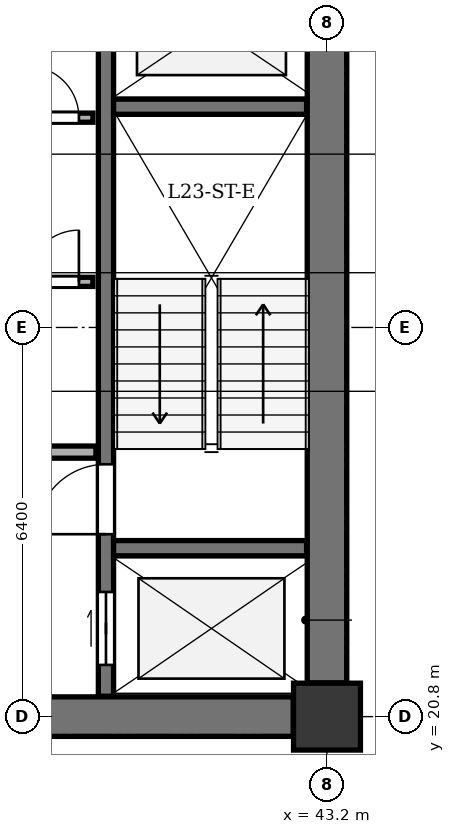
"""IFC4 building model, lengths in metres.
Left out: names, types, materials, properties, quantities, classifications, styles, units other than length and angle.
Written with IfcOpenShell. Run it as: python <this file> out.ifc"""

import sys

from ifc_helpers import new_model, si_unit, direction, frame, frame_2d, origin, origin_2d, place, context, subcontext, project, spatial, rectangle, extrude, element, fill, save


model = new_model("IFC4")
c1 = context("Model", 3, precision=1e-05, world=origin(), true_north=direction((0.0, 1.0)))
c2 = subcontext(c1, "Body", "Model", "MODEL_VIEW")
j1 = project(units=[si_unit("LENGTHUNIT", "METRE"), si_unit("PLANEANGLEUNIT", "RADIAN")], contexts=[c1])
p1 = place(None, origin())
s1 = spatial("IfcSite", under=j1, at=p1, CompositionType="ELEMENT")
p2 = place(p1, origin())
s2 = spatial("IfcBuilding", under=s1, at=p2, CompositionType="ELEMENT")
p3 = place(p2, frame((0.0, 0.0, 94.5)))
s3 = spatial("IfcBuildingStorey", under=s2, at=p3, CompositionType="ELEMENT", Elevation=94.5)
p4 = place(p3, frame((43.2, 20.8, 0.0), z_axis=(0.0, 0.0, 1.0), x_axis=(1.0, 0.0, 0.0)))
e1 = element("IfcColumn", 1, at=p4, inside=s3, PredefinedType="COLUMN", context=c2, shape_type="SweptSolid", body=[
    extrude(rectangle(XDim=1.1, YDim=1.1, at=origin_2d()), origin(), (0.0, 0.0, 1.0), 3.9),
])
p5 = place(p3, frame((43.2, 21.355, 0.0), z_axis=(0.0, 0.0, 1.0), x_axis=(0.0, 1.0, 0.0)))
e2 = element("IfcWall", 2, at=p5, inside=s3, PredefinedType="SHEAR", context=c2, shape_type="SweptSolid", body=[
    extrude(rectangle(XDim=11.69, YDim=0.65, at=frame_2d((5.845, 0.0))), origin(), (0.0, 0.0, 1.0), 3.6),
])
p6 = place(p3, frame((35.755, 20.8, 0.0), z_axis=(0.0, 0.0, 1.0), x_axis=(1.0, 0.0, 0.0)))
e3 = element("IfcWall", 3, at=p6, inside=s3, PredefinedType="SHEAR", context=c2, shape_type="SweptSolid", body=[
    extrude(rectangle(XDim=6.89, YDim=0.65, at=frame_2d((3.445, 0.0))), origin(), (0.0, 0.0, 1.0), 3.6),
])
p7 = place(p3, frame((39.565, 21.135, 0.0), z_axis=(0.0, 0.0, 1.0), x_axis=(0.0, 1.0, 0.0)))
e4 = element("IfcWall", 4, at=p7, inside=s3, PredefinedType="SHEAR", context=c2, shape_type="SweptSolid", body=[
    extrude(rectangle(XDim=12.13, YDim=0.25, at=frame_2d((6.065, 0.0))), origin(), (0.0, 0.0, 1.0), 3.6),
])
p8 = place(p7, frame((0.515, 0.0, 0.0)))
e5 = element("IfcOpeningElement", 5, at=p8, cuts=e4, PredefinedType="OPENING", context=c2, shape_type="SweptSolid", body=[
    extrude(rectangle(XDim=1.2, YDim=2.15, at=frame_2d((0.6, 1.075))), frame((0.0, 0.135, 0.0), z_axis=(0.0, -1.0, 0.0), x_axis=(1.0, 0.0, 0.0)), (0.0, 0.0, 1.0), 0.27),
])
p9 = place(p7, frame((2.665, 0.0, 0.0)))
e6 = element("IfcOpeningElement", 6, at=p9, cuts=e4, PredefinedType="OPENING", context=c2, shape_type="SweptSolid", body=[
    extrude(rectangle(XDim=1.15, YDim=2.15, at=frame_2d((0.575, 1.075))), frame((0.0, 0.135, 0.0), z_axis=(0.0, -1.0, 0.0), x_axis=(1.0, 0.0, 0.0)), (0.0, 0.0, 1.0), 0.27),
])
for number, where, z_axis, x_axis in (
    (7, (39.69, 23.57, 0.0), (0.0, 0.0, 1.0), (1.0, 0.0, 0.0)),
    (8, (39.69, 30.83, 0.0), (0.0, 0.0, 1.0), (1.0, 0.0, 0.0)),
):
    element("IfcWall", number, at=place(p3, frame(where, z_axis=z_axis, x_axis=x_axis)), inside=s3, PredefinedType="SHEAR", context=c2, shape_type="SweptSolid", body=[
        extrude(rectangle(XDim=3.175, YDim=0.25, at=frame_2d((1.587, 0.0))), origin(), (0.0, 0.0, 1.0), 3.6),
    ])
p10 = place(p3, frame((35.535, 25.15, 0.0), z_axis=(0.0, 0.0, 1.0), x_axis=(1.0, 0.0, 0.0)))
e9 = element("IfcWall", 9, at=p10, inside=s3, PredefinedType="SOLIDWALL", context=c2, shape_type="SweptSolid", body=[
    extrude(rectangle(XDim=3.865, YDim=0.2, at=frame_2d((1.933, 0.0))), origin(), (0.0, 0.0, 1.0), 3.6),
])
p11 = place(p3, frame((38.05, 27.95, 0.0), z_axis=(0.0, 0.0, 1.0), x_axis=(1.0, 0.0, 0.0)))
e10 = element("IfcWall", 10, at=p11, inside=s3, PredefinedType="PARTITIONING", context=c2, shape_type="SweptSolid", body=[
    extrude(rectangle(XDim=1.3, YDim=0.15, at=frame_2d((0.65, 0.0))), origin(), (0.0, 0.0, 1.0), 3.6),
])
p12 = place(p11, frame((0.22, 0.0, 0.0)))
e11 = element("IfcOpeningElement", 11, at=p12, cuts=e10, PredefinedType="OPENING", context=c2, shape_type="SweptSolid", body=[
    extrude(rectangle(XDim=0.85, YDim=2.02, at=frame_2d((0.425, 1.01))), frame((0.0, 0.085, 0.0), z_axis=(0.0, -1.0, 0.0), x_axis=(1.0, 0.0, 0.0)), (0.0, 0.0, 1.0), 0.17),
])
p13 = place(p3, frame((38.05, 30.65, 0.0), z_axis=(0.0, 0.0, 1.0), x_axis=(1.0, 0.0, 0.0)))
e12 = element("IfcWall", 12, at=p13, inside=s3, PredefinedType="PARTITIONING", context=c2, shape_type="SweptSolid", body=[
    extrude(rectangle(XDim=1.3, YDim=0.15, at=frame_2d((0.65, 0.0))), origin(), (0.0, 0.0, 1.0), 3.6),
])
p14 = place(p13, frame((0.22, 0.0, 0.0)))
e13 = element("IfcOpeningElement", 13, at=p14, cuts=e12, PredefinedType="OPENING", context=c2, shape_type="SweptSolid", body=[
    extrude(rectangle(XDim=0.85, YDim=2.02, at=frame_2d((0.425, 1.01))), frame((0.0, 0.085, 0.0), z_axis=(0.0, -1.0, 0.0), x_axis=(1.0, 0.0, 0.0)), (0.0, 0.0, 1.0), 0.17),
])
p15 = place(p8, origin())
e14 = element("IfcDoor", 14, at=p15, inside=s3, OperationType="DOUBLE_DOOR_SLIDING", PredefinedType="DOOR", context=c2, shape_type="SweptSolid", body=[
    extrude(rectangle(XDim=1.2, YDim=2.15, at=frame_2d((0.6, 1.075))), frame((0.0, 0.025, 0.0), z_axis=(0.0, -1.0, 0.0), x_axis=(1.0, 0.0, 0.0)), (0.0, 0.0, 1.0), 0.05),
])
fill(e5, e14)
p16 = place(p9, origin())
e15 = element("IfcDoor", 15, at=p16, inside=s3, OperationType="SINGLE_SWING_LEFT", PredefinedType="DOOR", context=c2, shape_type="SweptSolid", body=[
    extrude(rectangle(XDim=1.15, YDim=2.15, at=frame_2d((0.575, 1.075))), frame((0.0, 0.025, 0.0), z_axis=(0.0, -1.0, 0.0), x_axis=(1.0, 0.0, 0.0)), (0.0, 0.0, 1.0), 0.05),
])
fill(e6, e15)
p17 = place(p12, origin())
e16 = element("IfcDoor", 16, at=p17, inside=s3, OperationType="SINGLE_SWING_RIGHT", PredefinedType="DOOR", context=c2, shape_type="SweptSolid", body=[
    extrude(rectangle(XDim=0.85, YDim=2.02, at=frame_2d((0.425, 1.01))), frame((0.0, 0.025, 0.0), z_axis=(0.0, -1.0, 0.0), x_axis=(1.0, 0.0, 0.0)), (0.0, 0.0, 1.0), 0.05),
])
fill(e11, e16)
p18 = place(p14, origin())
e17 = element("IfcDoor", 17, at=p18, inside=s3, OperationType="SINGLE_SWING_LEFT", PredefinedType="DOOR", context=c2, shape_type="SweptSolid", body=[
    extrude(rectangle(XDim=0.85, YDim=2.02, at=frame_2d((0.425, 1.01))), frame((0.0, 0.025, 0.0), z_axis=(0.0, -1.0, 0.0), x_axis=(1.0, 0.0, 0.0)), (0.0, 0.0, 1.0), 0.05),
])
fill(e13, e17)
save(model, sys.argv[1])
